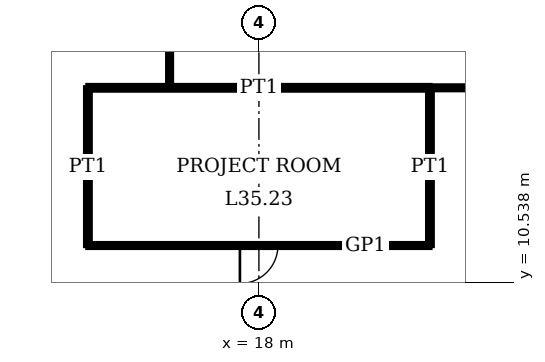
"""IFC4 building model, lengths in metres.
Left out: names, types, materials, properties, quantities, classifications, styles, units other than length and angle.
Written with IfcOpenShell. Run it as: python <this file> out.ifc"""

import sys

from ifc_helpers import new_model, si_unit, direction, frame, frame_2d, origin, place, context, subcontext, project, spatial, rectangle, extrude, element, fill, save


model = new_model("IFC4")
c1 = context("Model", 3, precision=1e-05, world=origin(), true_north=direction((0.0, 1.0)))
c2 = subcontext(c1, "Body", "Model", "MODEL_VIEW")
j1 = project(units=[si_unit("LENGTHUNIT", "METRE"), si_unit("PLANEANGLEUNIT", "RADIAN")], contexts=[c1])
p1 = place(None, origin())
s1 = spatial("IfcSite", under=j1, at=p1, CompositionType="ELEMENT")
p2 = place(p1, origin())
s2 = spatial("IfcBuilding", under=s1, at=p2, CompositionType="ELEMENT")
p3 = place(p2, frame((0.0, 0.0, 145.0)))
s3 = spatial("IfcBuildingStorey", under=s2, at=p3, CompositionType="ELEMENT", Elevation=145.0)
p4 = place(p3, frame((13.5, 11.5, 0.0), z_axis=(0.0, 0.0, 1.0), x_axis=(1.0, 0.0, 0.0)))
e1 = element("IfcWall", 1, at=p4, inside=s3, PredefinedType="PARTITIONING", context=c2, shape_type="SweptSolid", body=[
    extrude(rectangle(XDim=9.0, YDim=0.1, at=frame_2d((4.5, 0.0))), origin(), (0.0, 0.0, 1.0), 3.75),
])
p5 = place(p4, frame((4.0, 0.0, 0.0)))
e2 = element("IfcOpeningElement", 2, at=p5, cuts=e1, PredefinedType="OPENING", context=c2, shape_type="SweptSolid", body=[
    extrude(rectangle(XDim=1.0, YDim=2.4, at=frame_2d((0.5, 1.2))), frame((0.0, 0.06, 0.0), z_axis=(0.0, -1.0, 0.0), x_axis=(1.0, 0.0, 0.0)), (0.0, 0.0, 1.0), 0.12),
])
p6 = place(p3, frame((13.5, 15.65, 0.0), z_axis=(0.0, 0.0, 1.0), x_axis=(1.0, 0.0, 0.0)))
e3 = element("IfcWall", 3, at=p6, inside=s3, PredefinedType="PARTITIONING", context=c2, shape_type="SweptSolid", body=[
    extrude(rectangle(XDim=9.0, YDim=0.12, at=frame_2d((4.5, 0.0))), origin(), (0.0, 0.0, 1.0), 3.75),
])
p7 = place(p3, frame((22.5, 15.65, 0.0), z_axis=(0.0, 0.0, 1.0), x_axis=(1.0, 0.0, 0.0)))
e4 = element("IfcWall", 4, at=p7, inside=s3, PredefinedType="PARTITIONING", context=c2, shape_type="SweptSolid", body=[
    extrude(rectangle(XDim=24.85, YDim=0.1, at=frame_2d((12.425, 0.0))), origin(), (0.0, 0.0, 1.0), 3.75),
])
p8 = place(p7, frame((11.925, 0.0, 0.0)))
e5 = element("IfcOpeningElement", 5, at=p8, cuts=e4, PredefinedType="OPENING", context=c2, shape_type="SweptSolid", body=[
    extrude(rectangle(XDim=1.0, YDim=2.4, at=frame_2d((0.5, 1.2))), frame((0.0, 0.06, 0.0), z_axis=(0.0, -1.0, 0.0), x_axis=(1.0, 0.0, 0.0)), (0.0, 0.0, 1.0), 0.12),
])
p9 = place(p3, frame((13.5, 11.5, 0.0), z_axis=(0.0, 0.0, 1.0), x_axis=(0.0, 1.0, 0.0)))
e6 = element("IfcWall", 6, at=p9, inside=s3, PredefinedType="PARTITIONING", context=c2, shape_type="SweptSolid", body=[
    extrude(rectangle(XDim=4.15, YDim=0.12, at=frame_2d((2.075, 0.0))), origin(), (0.0, 0.0, 1.0), 3.75),
])
p10 = place(p3, frame((15.65, 15.65, 0.0), z_axis=(0.0, 0.0, 1.0), x_axis=(0.0, 1.0, 0.0)))
e7 = element("IfcWall", 7, at=p10, inside=s3, PredefinedType="PARTITIONING", context=c2, shape_type="SweptSolid", body=[
    extrude(rectangle(XDim=6.85, YDim=0.1, at=frame_2d((3.425, 0.0))), origin(), (0.0, 0.0, 1.0), 3.75),
])
p11 = place(p10, frame((2.925, 0.0, 0.0)))
e8 = element("IfcOpeningElement", 8, at=p11, cuts=e7, PredefinedType="OPENING", context=c2, shape_type="SweptSolid", body=[
    extrude(rectangle(XDim=1.0, YDim=2.4, at=frame_2d((0.5, 1.2))), frame((0.0, 0.06, 0.0), z_axis=(0.0, -1.0, 0.0), x_axis=(1.0, 0.0, 0.0)), (0.0, 0.0, 1.0), 0.12),
])
p12 = place(p3, frame((22.5, 11.5, 0.0), z_axis=(0.0, 0.0, 1.0), x_axis=(0.0, 1.0, 0.0)))
e9 = element("IfcWall", 9, at=p12, inside=s3, PredefinedType="PARTITIONING", context=c2, shape_type="SweptSolid", body=[
    extrude(rectangle(XDim=4.15, YDim=0.12, at=frame_2d((2.075, 0.0))), origin(), (0.0, 0.0, 1.0), 3.75),
])
p13 = place(p5, origin())
e10 = element("IfcDoor", 10, at=p13, inside=s3, OperationType="SINGLE_SWING_LEFT", PredefinedType="DOOR", context=c2, shape_type="SweptSolid", body=[
    extrude(rectangle(XDim=1.0, YDim=2.4, at=frame_2d((0.5, 1.2))), frame((0.0, 0.02, 0.0), z_axis=(0.0, -1.0, 0.0), x_axis=(1.0, 0.0, 0.0)), (0.0, 0.0, 1.0), 0.04),
])
fill(e2, e10)
save(model, sys.argv[1])
